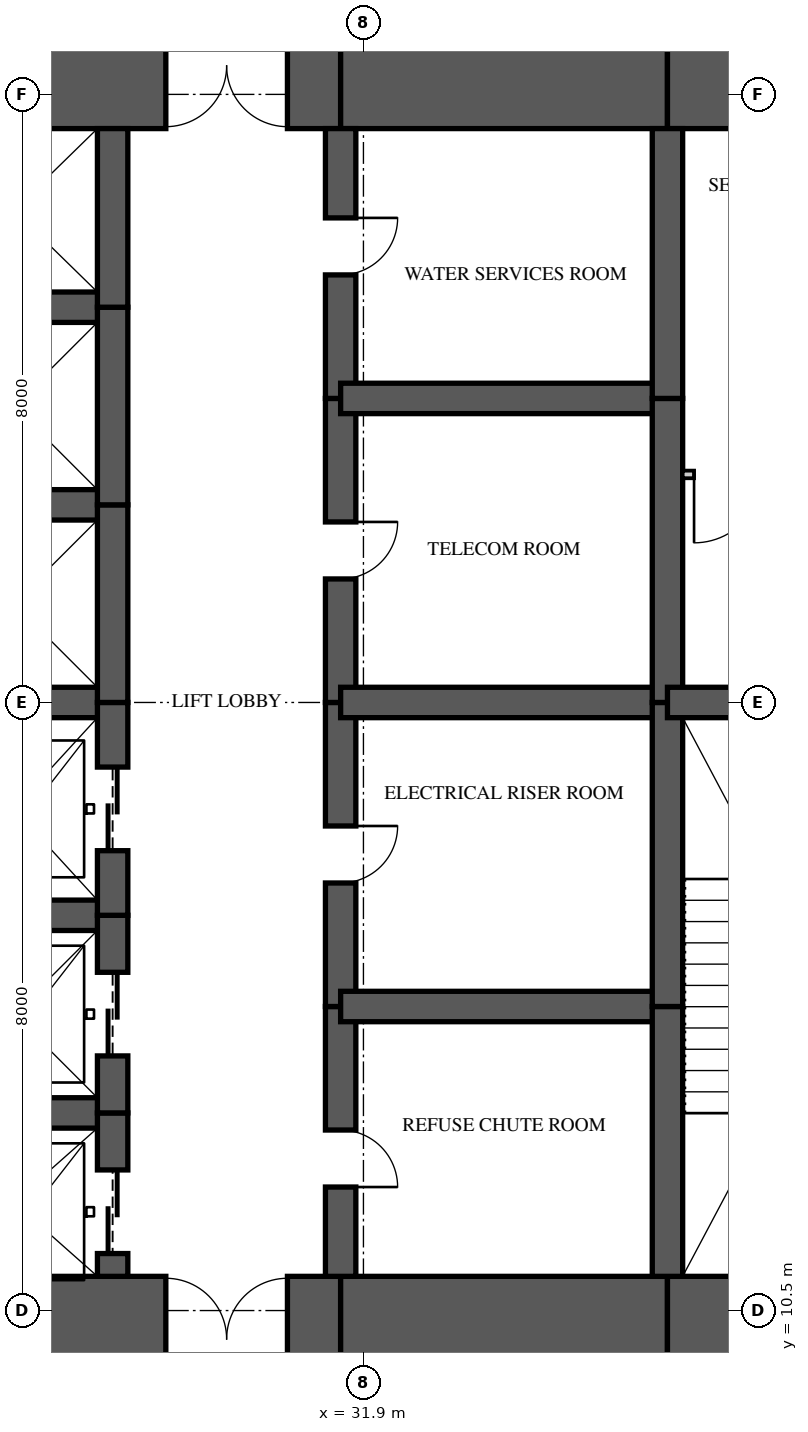
"""IFC4 building model, lengths in metres.
Left out: names, types, materials, properties, quantities, classifications, styles, units other than length and angle.
Written with IfcOpenShell. Run it as: python <this file> out.ifc"""

import sys

from ifc_helpers import new_model, si_unit, direction, frame, frame_2d, origin, place, context, subcontext, project, spatial, rectangle, extrude, element, fill, save


model = new_model("IFC4")
c1 = context("Model", 3, precision=1e-05, world=origin(), true_north=direction((0.0, 1.0)))
c2 = subcontext(c1, "Body", "Model", "MODEL_VIEW")
j1 = project(units=[si_unit("LENGTHUNIT", "METRE"), si_unit("PLANEANGLEUNIT", "RADIAN")], contexts=[c1])
p1 = place(None, origin())
s1 = spatial("IfcSite", under=j1, at=p1, CompositionType="ELEMENT")
p2 = place(p1, origin())
s2 = spatial("IfcBuilding", under=s1, at=p2, CompositionType="ELEMENT")
p3 = place(p2, frame((0.0, 0.0, 31.05)))
s3 = spatial("IfcBuildingStorey", under=s2, at=p3, CompositionType="ELEMENT", Elevation=31.05)
p4 = place(p3, frame((26.0, 10.125, 0.0), z_axis=(0.0, 0.0, 1.0), x_axis=(1.0, 0.0, 0.0)))
e1 = element("IfcWall", 1, at=p4, inside=s3, PredefinedType="SHEAR", context=c2, shape_type="SweptSolid", body=[
    extrude(rectangle(XDim=5.6, YDim=1.65, at=frame_2d((2.8, 0.0))), origin(), (0.0, 0.0, 1.0), 3.35),
])
p5 = place(p4, frame((3.3, 0.0, 0.0)))
e2 = element("IfcOpeningElement", 2, at=p5, cuts=e1, PredefinedType="OPENING", context=c2, shape_type="SweptSolid", body=[
    extrude(rectangle(XDim=1.6, YDim=2.1, at=frame_2d((0.8, 1.05))), frame((0.0, 0.835, 0.0), z_axis=(0.0, -1.0, 0.0), x_axis=(1.0, 0.0, 0.0)), (0.0, 0.0, 1.0), 1.67),
])
p6 = place(p3, frame((31.6, 10.125, 0.0), z_axis=(0.0, 0.0, 1.0), x_axis=(1.0, 0.0, 0.0)))
e3 = element("IfcWall", 3, at=p6, inside=s3, PredefinedType="SHEAR", context=c2, shape_type="SweptSolid", body=[
    extrude(rectangle(XDim=4.3, YDim=1.65, at=frame_2d((2.15, 0.0))), origin(), (0.0, 0.0, 1.0), 3.35),
])
p7 = place(p3, frame((35.9, 10.125, 0.0), z_axis=(0.0, 0.0, 1.0), x_axis=(1.0, 0.0, 0.0)))
e4 = element("IfcWall", 4, at=p7, inside=s3, PredefinedType="SHEAR", context=c2, shape_type="SweptSolid", body=[
    extrude(rectangle(XDim=8.375, YDim=1.65, at=frame_2d((4.188, 0.0))), origin(), (0.0, 0.0, 1.0), 3.35),
])
p8 = place(p7, frame((2.7, 0.0, 0.0)))
e5 = element("IfcOpeningElement", 5, at=p8, cuts=e4, PredefinedType="OPENING", context=c2, shape_type="SweptSolid", body=[
    extrude(rectangle(XDim=1.0, YDim=2.1, at=frame_2d((0.5, 1.05))), frame((0.0, 0.835, 0.0), z_axis=(0.0, -1.0, 0.0), x_axis=(1.0, 0.0, 0.0)), (0.0, 0.0, 1.0), 1.67),
])
p9 = place(p3, frame((44.275, 26.875, 0.0), z_axis=(0.0, 0.0, 1.0), x_axis=(-1.0, 0.0, 0.0)))
e6 = element("IfcWall", 6, at=p9, inside=s3, PredefinedType="SHEAR", context=c2, shape_type="SweptSolid", body=[
    extrude(rectangle(XDim=8.375, YDim=1.65, at=frame_2d((4.188, 0.0))), origin(), (0.0, 0.0, 1.0), 3.35),
])
p10 = place(p9, frame((5.775, 0.0, 0.0)))
e7 = element("IfcOpeningElement", 7, at=p10, cuts=e6, PredefinedType="OPENING", context=c2, shape_type="SweptSolid", body=[
    extrude(rectangle(XDim=0.9, YDim=2.1, at=frame_2d((0.45, 1.05))), frame((0.0, 0.835, 0.0), z_axis=(0.0, -1.0, 0.0), x_axis=(1.0, 0.0, 0.0)), (0.0, 0.0, 1.0), 1.67),
])
p11 = place(p3, frame((35.9, 26.875, 0.0), z_axis=(0.0, 0.0, 1.0), x_axis=(-1.0, 0.0, 0.0)))
e8 = element("IfcWall", 8, at=p11, inside=s3, PredefinedType="SHEAR", context=c2, shape_type="SweptSolid", body=[
    extrude(rectangle(XDim=4.3, YDim=1.65, at=frame_2d((2.15, 0.0))), origin(), (0.0, 0.0, 1.0), 3.35),
])
p12 = place(p3, frame((31.6, 26.875, 0.0), z_axis=(0.0, 0.0, 1.0), x_axis=(-1.0, 0.0, 0.0)))
e9 = element("IfcWall", 9, at=p12, inside=s3, PredefinedType="SHEAR", context=c2, shape_type="SweptSolid", body=[
    extrude(rectangle(XDim=5.6, YDim=1.65, at=frame_2d((2.8, 0.0))), origin(), (0.0, 0.0, 1.0), 3.35),
])
p13 = place(p12, frame((0.7, 0.0, 0.0)))
e10 = element("IfcOpeningElement", 10, at=p13, cuts=e9, PredefinedType="OPENING", context=c2, shape_type="SweptSolid", body=[
    extrude(rectangle(XDim=1.6, YDim=2.1, at=frame_2d((0.8, 1.05))), frame((0.0, 0.835, 0.0), z_axis=(0.0, -1.0, 0.0), x_axis=(1.0, 0.0, 0.0)), (0.0, 0.0, 1.0), 1.67),
])
p14 = place(p3, frame((28.6, 10.95, 0.0), z_axis=(0.0, 0.0, 1.0), x_axis=(0.0, 1.0, 0.0)))
e11 = element("IfcWall", 11, at=p14, inside=s3, PredefinedType="SHEAR", context=c2, shape_type="SweptSolid", body=[
    extrude(rectangle(XDim=2.15, YDim=0.4, at=frame_2d((1.075, 0.0))), origin(), (0.0, 0.0, 1.0), 3.35),
])
p15 = place(p14, frame((0.3, 0.0, 0.0)))
e12 = element("IfcOpeningElement", 12, at=p15, cuts=e11, PredefinedType="OPENING", context=c2, shape_type="SweptSolid", body=[
    extrude(rectangle(XDim=1.1, YDim=2.1, at=frame_2d((0.55, 1.05))), frame((0.0, 0.21, 0.0), z_axis=(0.0, -1.0, 0.0), x_axis=(1.0, 0.0, 0.0)), (0.0, 0.0, 1.0), 0.42),
])
p16 = place(p3, frame((28.6, 13.1, 0.0), z_axis=(0.0, 0.0, 1.0), x_axis=(0.0, 1.0, 0.0)))
e13 = element("IfcWall", 13, at=p16, inside=s3, PredefinedType="SHEAR", context=c2, shape_type="SweptSolid", body=[
    extrude(rectangle(XDim=2.6, YDim=0.4, at=frame_2d((1.3, 0.0))), origin(), (0.0, 0.0, 1.0), 3.35),
])
p17 = place(p16, frame((0.75, 0.0, 0.0)))
e14 = element("IfcOpeningElement", 14, at=p17, cuts=e13, PredefinedType="OPENING", context=c2, shape_type="SweptSolid", body=[
    extrude(rectangle(XDim=1.1, YDim=2.1, at=frame_2d((0.55, 1.05))), frame((0.0, 0.21, 0.0), z_axis=(0.0, -1.0, 0.0), x_axis=(1.0, 0.0, 0.0)), (0.0, 0.0, 1.0), 0.42),
])
p18 = place(p3, frame((28.6, 15.7, 0.0), z_axis=(0.0, 0.0, 1.0), x_axis=(0.0, 1.0, 0.0)))
e15 = element("IfcWall", 15, at=p18, inside=s3, PredefinedType="SHEAR", context=c2, shape_type="SweptSolid", body=[
    extrude(rectangle(XDim=2.8, YDim=0.4, at=frame_2d((1.4, 0.0))), origin(), (0.0, 0.0, 1.0), 3.35),
])
p19 = place(p18, frame((0.85, 0.0, 0.0)))
e16 = element("IfcOpeningElement", 16, at=p19, cuts=e15, PredefinedType="OPENING", context=c2, shape_type="SweptSolid", body=[
    extrude(rectangle(XDim=1.1, YDim=2.1, at=frame_2d((0.55, 1.05))), frame((0.0, 0.21, 0.0), z_axis=(0.0, -1.0, 0.0), x_axis=(1.0, 0.0, 0.0)), (0.0, 0.0, 1.0), 0.42),
])
p20 = place(p3, frame((28.6, 18.5, 0.0), z_axis=(0.0, 0.0, 1.0), x_axis=(0.0, 1.0, 0.0)))
e17 = element("IfcWall", 17, at=p20, inside=s3, PredefinedType="SHEAR", context=c2, shape_type="SweptSolid", body=[
    extrude(rectangle(XDim=2.6, YDim=0.4, at=frame_2d((1.3, 0.0))), origin(), (0.0, 0.0, 1.0), 3.35),
])
p21 = place(p3, frame((28.6, 21.1, 0.0), z_axis=(0.0, 0.0, 1.0), x_axis=(0.0, 1.0, 0.0)))
e18 = element("IfcWall", 18, at=p21, inside=s3, PredefinedType="SHEAR", context=c2, shape_type="SweptSolid", body=[
    extrude(rectangle(XDim=2.6, YDim=0.4, at=frame_2d((1.3, 0.0))), origin(), (0.0, 0.0, 1.0), 3.35),
])
p22 = place(p3, frame((28.6, 23.7, 0.0), z_axis=(0.0, 0.0, 1.0), x_axis=(0.0, 1.0, 0.0)))
e19 = element("IfcWall", 19, at=p22, inside=s3, PredefinedType="SHEAR", context=c2, shape_type="SweptSolid", body=[
    extrude(rectangle(XDim=2.35, YDim=0.4, at=frame_2d((1.175, 0.0))), origin(), (0.0, 0.0, 1.0), 3.35),
])
p23 = place(p3, frame((31.6, 10.95, 0.0), z_axis=(0.0, 0.0, 1.0), x_axis=(0.0, 1.0, 0.0)))
e20 = element("IfcWall", 20, at=p23, inside=s3, PredefinedType="SHEAR", context=c2, shape_type="SweptSolid", body=[
    extrude(rectangle(XDim=3.55, YDim=0.4, at=frame_2d((1.775, 0.0))), origin(), (0.0, 0.0, 1.0), 3.35),
])
p24 = place(p23, frame((1.175, 0.0, 0.0)))
e21 = element("IfcOpeningElement", 21, at=p24, cuts=e20, PredefinedType="OPENING", context=c2, shape_type="SweptSolid", body=[
    extrude(rectangle(XDim=0.75, YDim=2.1, at=frame_2d((0.375, 1.05))), frame((0.0, 0.21, 0.0), z_axis=(0.0, -1.0, 0.0), x_axis=(1.0, 0.0, 0.0)), (0.0, 0.0, 1.0), 0.42),
])
p25 = place(p3, frame((31.6, 14.5, 0.0), z_axis=(0.0, 0.0, 1.0), x_axis=(0.0, 1.0, 0.0)))
e22 = element("IfcWall", 22, at=p25, inside=s3, PredefinedType="SHEAR", context=c2, shape_type="SweptSolid", body=[
    extrude(rectangle(XDim=4.0, YDim=0.4, at=frame_2d((2.0, 0.0))), origin(), (0.0, 0.0, 1.0), 3.35),
])
p26 = place(p25, frame((1.625, 0.0, 0.0)))
e23 = element("IfcOpeningElement", 23, at=p26, cuts=e22, PredefinedType="OPENING", context=c2, shape_type="SweptSolid", body=[
    extrude(rectangle(XDim=0.75, YDim=2.1, at=frame_2d((0.375, 1.05))), frame((0.0, 0.21, 0.0), z_axis=(0.0, -1.0, 0.0), x_axis=(1.0, 0.0, 0.0)), (0.0, 0.0, 1.0), 0.42),
])
p27 = place(p3, frame((31.6, 18.5, 0.0), z_axis=(0.0, 0.0, 1.0), x_axis=(0.0, 1.0, 0.0)))
e24 = element("IfcWall", 24, at=p27, inside=s3, PredefinedType="SHEAR", context=c2, shape_type="SweptSolid", body=[
    extrude(rectangle(XDim=4.0, YDim=0.4, at=frame_2d((2.0, 0.0))), origin(), (0.0, 0.0, 1.0), 3.35),
])
p28 = place(p27, frame((1.625, 0.0, 0.0)))
e25 = element("IfcOpeningElement", 25, at=p28, cuts=e24, PredefinedType="OPENING", context=c2, shape_type="SweptSolid", body=[
    extrude(rectangle(XDim=0.75, YDim=2.1, at=frame_2d((0.375, 1.05))), frame((0.0, 0.21, 0.0), z_axis=(0.0, -1.0, 0.0), x_axis=(1.0, 0.0, 0.0)), (0.0, 0.0, 1.0), 0.42),
])
p29 = place(p3, frame((31.6, 22.5, 0.0), z_axis=(0.0, 0.0, 1.0), x_axis=(0.0, 1.0, 0.0)))
e26 = element("IfcWall", 26, at=p29, inside=s3, PredefinedType="SHEAR", context=c2, shape_type="SweptSolid", body=[
    extrude(rectangle(XDim=3.55, YDim=0.4, at=frame_2d((1.775, 0.0))), origin(), (0.0, 0.0, 1.0), 3.35),
])
p30 = place(p29, frame((1.625, 0.0, 0.0)))
e27 = element("IfcOpeningElement", 27, at=p30, cuts=e26, PredefinedType="OPENING", context=c2, shape_type="SweptSolid", body=[
    extrude(rectangle(XDim=0.75, YDim=2.1, at=frame_2d((0.375, 1.05))), frame((0.0, 0.21, 0.0), z_axis=(0.0, -1.0, 0.0), x_axis=(1.0, 0.0, 0.0)), (0.0, 0.0, 1.0), 0.42),
])
p31 = place(p3, frame((35.9, 10.95, 0.0), z_axis=(0.0, 0.0, 1.0), x_axis=(0.0, 1.0, 0.0)))
e28 = element("IfcWall", 28, at=p31, inside=s3, PredefinedType="SHEAR", context=c2, shape_type="SweptSolid", body=[
    extrude(rectangle(XDim=3.55, YDim=0.4, at=frame_2d((1.775, 0.0))), origin(), (0.0, 0.0, 1.0), 3.35),
])
for number, where, z_axis, x_axis in (
    (29, (35.9, 14.5, 0.0), (0.0, 0.0, 1.0), (0.0, 1.0, 0.0)),
    (30, (35.9, 18.5, 0.0), (0.0, 0.0, 1.0), (0.0, 1.0, 0.0)),
):
    element("IfcWall", number, at=place(p3, frame(where, z_axis=z_axis, x_axis=x_axis)), inside=s3, PredefinedType="SHEAR", context=c2, shape_type="SweptSolid", body=[
        extrude(rectangle(XDim=4.0, YDim=0.4, at=frame_2d((2.0, 0.0))), origin(), (0.0, 0.0, 1.0), 3.35),
    ])
p32 = place(p3, frame((35.9, 22.5, 0.0), z_axis=(0.0, 0.0, 1.0), x_axis=(0.0, 1.0, 0.0)))
e31 = element("IfcWall", 31, at=p32, inside=s3, PredefinedType="SHEAR", context=c2, shape_type="SweptSolid", body=[
    extrude(rectangle(XDim=3.55, YDim=0.4, at=frame_2d((1.775, 0.0))), origin(), (0.0, 0.0, 1.0), 3.35),
])
for number, where, z_axis, x_axis in (
    (32, (26.0, 13.1, 0.0), (0.0, 0.0, 1.0), (1.0, 0.0, 0.0)),
    (33, (26.0, 15.7, 0.0), (0.0, 0.0, 1.0), (1.0, 0.0, 0.0)),
    (34, (26.0, 18.5, 0.0), (0.0, 0.0, 1.0), (1.0, 0.0, 0.0)),
    (35, (26.0, 21.1, 0.0), (0.0, 0.0, 1.0), (1.0, 0.0, 0.0)),
    (36, (26.0, 23.7, 0.0), (0.0, 0.0, 1.0), (1.0, 0.0, 0.0)),
):
    element("IfcWall", number, at=place(p3, frame(where, z_axis=z_axis, x_axis=x_axis)), inside=s3, PredefinedType="SHEAR", context=c2, shape_type="SweptSolid", body=[
        extrude(rectangle(XDim=2.6, YDim=0.4, at=frame_2d((1.3, 0.0))), origin(), (0.0, 0.0, 1.0), 3.35),
    ])
for number, where, z_axis, x_axis in (
    (37, (31.6, 14.5, 0.0), (0.0, 0.0, 1.0), (1.0, 0.0, 0.0)),
    (38, (31.6, 18.5, 0.0), (0.0, 0.0, 1.0), (1.0, 0.0, 0.0)),
    (39, (31.6, 22.5, 0.0), (0.0, 0.0, 1.0), (1.0, 0.0, 0.0)),
):
    element("IfcWall", number, at=place(p3, frame(where, z_axis=z_axis, x_axis=x_axis)), inside=s3, PredefinedType="SHEAR", context=c2, shape_type="SweptSolid", body=[
        extrude(rectangle(XDim=4.3, YDim=0.4, at=frame_2d((2.15, 0.0))), origin(), (0.0, 0.0, 1.0), 3.35),
    ])
p33 = place(p3, frame((35.9, 18.5, 0.0), z_axis=(0.0, 0.0, 1.0), x_axis=(1.0, 0.0, 0.0)))
e40 = element("IfcWall", 40, at=p33, inside=s3, PredefinedType="SHEAR", context=c2, shape_type="SweptSolid", body=[
    extrude(rectangle(XDim=4.3, YDim=0.4, at=frame_2d((2.15, 0.0))), origin(), (0.0, 0.0, 1.0), 3.35),
])
p34 = place(p3, frame((36.1, 21.5, 0.0), z_axis=(0.0, 0.0, 1.0), x_axis=(1.0, 0.0, 0.0)))
e41 = element("IfcWall", 41, at=p34, inside=s3, PredefinedType="PARTITIONING", context=c2, shape_type="SweptSolid", body=[
    extrude(rectangle(XDim=3.9, YDim=0.1, at=frame_2d((1.95, 0.0))), origin(), (0.0, 0.0, 1.0), 3.11),
])
p35 = place(p34, frame((0.15, 0.0, 0.0)))
e42 = element("IfcOpeningElement", 42, at=p35, cuts=e41, PredefinedType="OPENING", context=c2, shape_type="SweptSolid", body=[
    extrude(rectangle(XDim=0.9, YDim=2.1, at=frame_2d((0.45, 1.05))), frame((0.0, 0.06, 0.0), z_axis=(0.0, -1.0, 0.0), x_axis=(1.0, 0.0, 0.0)), (0.0, 0.0, 1.0), 0.12),
])
p36 = place(p35, frame((0.9, 0.0, 0.0), z_axis=(0.0, 0.0, 1.0), x_axis=(-1.0, 0.0, 0.0)))
e43 = element("IfcDoor", 43, at=p36, inside=s3, OperationType="SINGLE_SWING_RIGHT", PredefinedType="DOOR", context=c2, shape_type="SweptSolid", body=[
    extrude(rectangle(XDim=0.9, YDim=2.1, at=frame_2d((0.45, 1.05))), frame((0.0, 0.025, 0.0), z_axis=(0.0, -1.0, 0.0), x_axis=(1.0, 0.0, 0.0)), (0.0, 0.0, 1.0), 0.05),
])
fill(e42, e43)
p37 = place(p15, origin())
e44 = element("IfcDoor", 44, at=p37, inside=s3, OperationType="SLIDING_TO_LEFT", PredefinedType="DOOR", context=c2, shape_type="SweptSolid", body=[
    extrude(rectangle(XDim=1.1, YDim=2.1, at=frame_2d((0.55, 1.05))), frame((0.0, 0.025, 0.0), z_axis=(0.0, -1.0, 0.0), x_axis=(1.0, 0.0, 0.0)), (0.0, 0.0, 1.0), 0.05),
])
fill(e12, e44)
p38 = place(p17, origin())
e45 = element("IfcDoor", 45, at=p38, inside=s3, OperationType="SLIDING_TO_LEFT", PredefinedType="DOOR", context=c2, shape_type="SweptSolid", body=[
    extrude(rectangle(XDim=1.1, YDim=2.1, at=frame_2d((0.55, 1.05))), frame((0.0, 0.025, 0.0), z_axis=(0.0, -1.0, 0.0), x_axis=(1.0, 0.0, 0.0)), (0.0, 0.0, 1.0), 0.05),
])
fill(e14, e45)
p39 = place(p19, origin())
e46 = element("IfcDoor", 46, at=p39, inside=s3, OperationType="SLIDING_TO_LEFT", PredefinedType="DOOR", context=c2, shape_type="SweptSolid", body=[
    extrude(rectangle(XDim=1.1, YDim=2.1, at=frame_2d((0.55, 1.05))), frame((0.0, 0.025, 0.0), z_axis=(0.0, -1.0, 0.0), x_axis=(1.0, 0.0, 0.0)), (0.0, 0.0, 1.0), 0.05),
])
fill(e16, e46)
p40 = place(p5, origin())
e47 = element("IfcDoor", 47, at=p40, inside=s3, OperationType="DOUBLE_DOOR_SINGLE_SWING", PredefinedType="DOOR", context=c2, shape_type="SweptSolid", body=[
    extrude(rectangle(XDim=1.6, YDim=2.1, at=frame_2d((0.8, 1.05))), frame((0.0, 0.025, 0.0), z_axis=(0.0, -1.0, 0.0), x_axis=(1.0, 0.0, 0.0)), (0.0, 0.0, 1.0), 0.05),
])
fill(e2, e47)
p41 = place(p13, origin())
e48 = element("IfcDoor", 48, at=p41, inside=s3, OperationType="DOUBLE_DOOR_SINGLE_SWING", PredefinedType="DOOR", context=c2, shape_type="SweptSolid", body=[
    extrude(rectangle(XDim=1.6, YDim=2.1, at=frame_2d((0.8, 1.05))), frame((0.0, 0.025, 0.0), z_axis=(0.0, -1.0, 0.0), x_axis=(1.0, 0.0, 0.0)), (0.0, 0.0, 1.0), 0.05),
])
fill(e10, e48)
p42 = place(p24, frame((0.75, 0.0, 0.0), z_axis=(0.0, 0.0, 1.0), x_axis=(-1.0, 0.0, 0.0)))
e49 = element("IfcDoor", 49, at=p42, inside=s3, OperationType="SINGLE_SWING_RIGHT", PredefinedType="DOOR", context=c2, shape_type="SweptSolid", body=[
    extrude(rectangle(XDim=0.75, YDim=2.1, at=frame_2d((0.375, 1.05))), frame((0.0, 0.025, 0.0), z_axis=(0.0, -1.0, 0.0), x_axis=(1.0, 0.0, 0.0)), (0.0, 0.0, 1.0), 0.05),
])
fill(e21, e49)
p43 = place(p26, frame((0.75, 0.0, 0.0), z_axis=(0.0, 0.0, 1.0), x_axis=(-1.0, 0.0, 0.0)))
e50 = element("IfcDoor", 50, at=p43, inside=s3, OperationType="SINGLE_SWING_LEFT", PredefinedType="DOOR", context=c2, shape_type="SweptSolid", body=[
    extrude(rectangle(XDim=0.75, YDim=2.1, at=frame_2d((0.375, 1.05))), frame((0.0, 0.025, 0.0), z_axis=(0.0, -1.0, 0.0), x_axis=(1.0, 0.0, 0.0)), (0.0, 0.0, 1.0), 0.05),
])
fill(e23, e50)
p44 = place(p28, frame((0.75, 0.0, 0.0), z_axis=(0.0, 0.0, 1.0), x_axis=(-1.0, 0.0, 0.0)))
e51 = element("IfcDoor", 51, at=p44, inside=s3, OperationType="SINGLE_SWING_LEFT", PredefinedType="DOOR", context=c2, shape_type="SweptSolid", body=[
    extrude(rectangle(XDim=0.75, YDim=2.1, at=frame_2d((0.375, 1.05))), frame((0.0, 0.025, 0.0), z_axis=(0.0, -1.0, 0.0), x_axis=(1.0, 0.0, 0.0)), (0.0, 0.0, 1.0), 0.05),
])
fill(e25, e51)
p45 = place(p30, frame((0.75, 0.0, 0.0), z_axis=(0.0, 0.0, 1.0), x_axis=(-1.0, 0.0, 0.0)))
e52 = element("IfcDoor", 52, at=p45, inside=s3, OperationType="SINGLE_SWING_LEFT", PredefinedType="DOOR", context=c2, shape_type="SweptSolid", body=[
    extrude(rectangle(XDim=0.75, YDim=2.1, at=frame_2d((0.375, 1.05))), frame((0.0, 0.025, 0.0), z_axis=(0.0, -1.0, 0.0), x_axis=(1.0, 0.0, 0.0)), (0.0, 0.0, 1.0), 0.05),
])
fill(e27, e52)
save(model, sys.argv[1])
